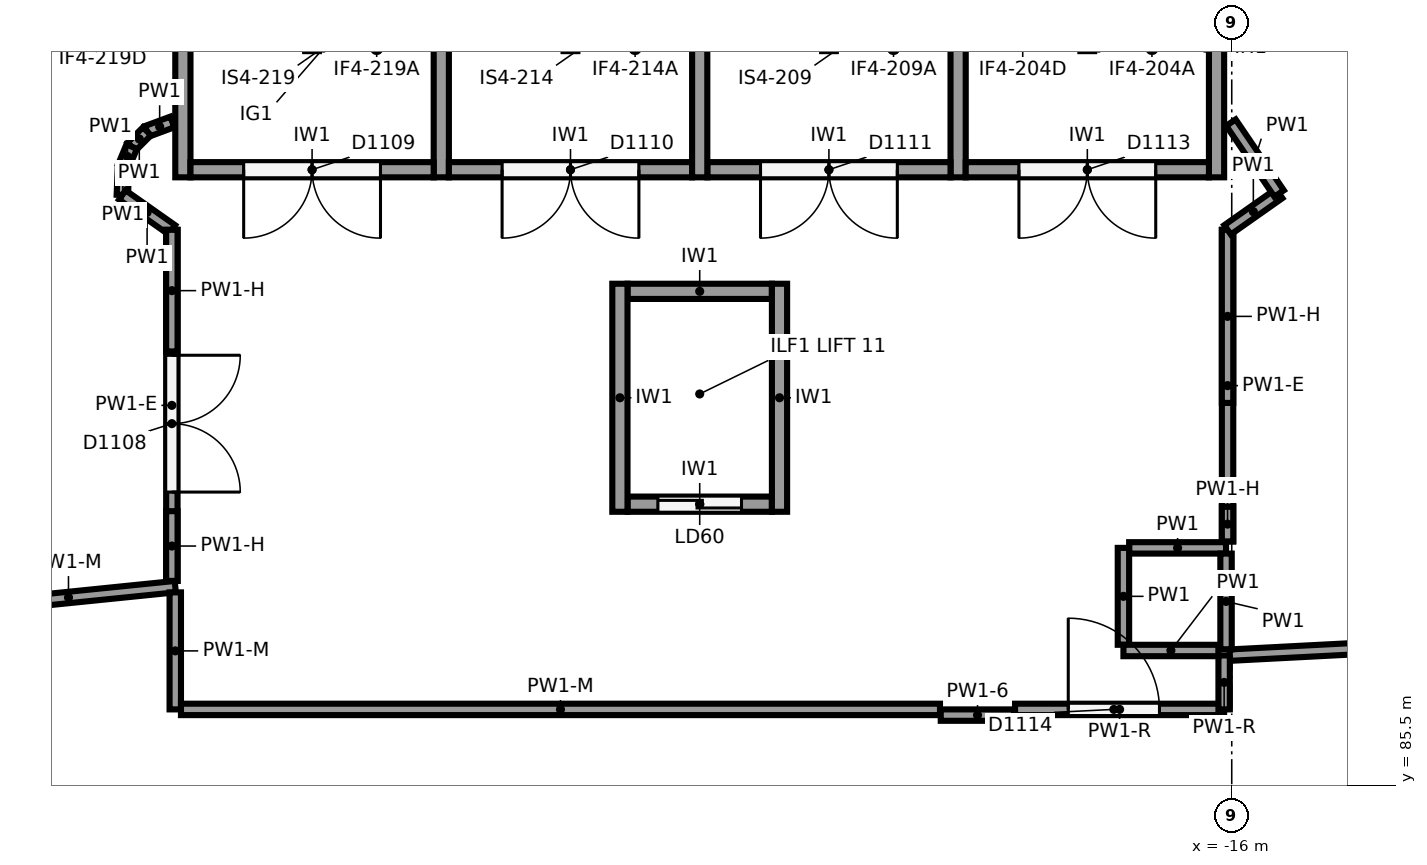
"""IFC4 building model, lengths in metres.
Left out: names, types, materials, properties, quantities, classifications, styles, units other than length and angle.
Written with IfcOpenShell. Run it as: python <this file> out.ifc"""

import sys

from ifc_helpers import new_model, si_unit, direction, frame, frame_2d, origin, origin_2d, place, context, subcontext, project, spatial, rectangle, circle, extrude, element, fill, save


model = new_model("IFC4")
c1 = context("Model", 3, precision=1e-05, world=origin(), true_north=direction((0.0, 1.0)))
c2 = subcontext(c1, "Body", "Model", "MODEL_VIEW")
j1 = project(units=[si_unit("LENGTHUNIT", "METRE"), si_unit("PLANEANGLEUNIT", "RADIAN")], contexts=[c1])
p1 = place(None, origin())
s1 = spatial("IfcSite", under=j1, at=p1, CompositionType="ELEMENT")
p2 = place(p1, origin())
s2 = spatial("IfcBuilding", under=s1, at=p2, CompositionType="ELEMENT")
p3 = place(p2, frame((0.0, 0.0, 12.0)))
s3 = spatial("IfcBuildingStorey", under=s2, at=p3, CompositionType="ELEMENT", Elevation=12.0)
p4 = place(p3, frame((-19.119, 85.698, 0.0), z_axis=(0.0, 0.0, 1.0), x_axis=(1.0, 0.0, 0.0)))
e1 = element("IfcColumn", 1, at=p4, inside=s3, PredefinedType="COLUMN", context=c2, shape_type="SweptSolid", body=[
    extrude(circle(Radius=0.4, at=origin_2d()), origin(), (0.0, 0.0, 1.0), 6.0),
])
p5 = place(p3, frame((-19.627, 89.904, 0.0), z_axis=(0.0, 0.0, 1.0), x_axis=(1.0, 0.0, 0.0)))
e2 = element("IfcColumn", 2, at=p5, inside=s3, PredefinedType="COLUMN", context=c2, shape_type="SweptSolid", body=[
    extrude(circle(Radius=0.55, at=origin_2d()), origin(), (0.0, 0.0, 1.0), 6.0),
])
p6 = place(p3, frame((-31.737, 85.377, 0.0), z_axis=(0.0, 0.0, 1.0), x_axis=(1.0, 0.0, 0.0)))
e3 = element("IfcColumn", 3, at=p6, inside=s3, PredefinedType="COLUMN", context=c2, shape_type="SweptSolid", body=[
    extrude(circle(Radius=0.4, at=origin_2d()), origin(), (0.0, 0.0, 1.0), 6.0),
])
for number, where, z_axis, x_axis in (
    (4, (-16.2, 102.3, 0.0), (0.0, 0.0, 1.0), (0.0, -1.0, 0.0)),
    (5, (-23.0, 102.3, 0.0), (0.0, 0.0, 1.0), (0.0, -1.0, 0.0)),
    (6, (-29.8, 102.3, 0.0), (0.0, 0.0, 1.0), (0.0, -1.0, 0.0)),
    (7, (-19.6, 102.3, 0.0), (0.0, 0.0, 1.0), (0.0, -1.0, 0.0)),
    (8, (-26.4, 102.3, 0.0), (0.0, 0.0, 1.0), (0.0, -1.0, 0.0)),
):
    element("IfcWall", number, at=place(p3, frame(where, z_axis=z_axis, x_axis=x_axis)), inside=s3, PredefinedType="SHEAR", context=c2, shape_type="SweptSolid", body=[
        extrude(rectangle(XDim=8.8, YDim=0.2, at=frame_2d((4.4, 0.0))), origin(), (0.0, 0.0, 1.0), 5.65),
    ])
p7 = place(p3, frame((-16.3, 93.6, 0.0), z_axis=(0.0, 0.0, 1.0), x_axis=(-1.0, 0.0, 0.0)))
e9 = element("IfcWall", 9, at=p7, inside=s3, PredefinedType="SHEAR", context=c2, shape_type="SweptSolid", body=[
    extrude(rectangle(XDim=3.2, YDim=0.2, at=frame_2d((1.6, 0.0))), origin(), (0.0, 0.0, 1.0), 5.65),
])
p8 = place(p7, frame((0.7, 0.0, 0.0)))
e10 = element("IfcOpeningElement", 10, at=p8, cuts=e9, PredefinedType="OPENING", context=c2, shape_type="SweptSolid", body=[
    extrude(rectangle(XDim=1.8, YDim=2.1, at=frame_2d((0.9, 1.05))), frame((0.0, 0.11, 0.0), z_axis=(0.0, -1.0, 0.0), x_axis=(1.0, 0.0, 0.0)), (0.0, 0.0, 1.0), 0.22),
])
p9 = place(p3, frame((-19.7, 93.6, 0.0), z_axis=(0.0, 0.0, 1.0), x_axis=(-1.0, 0.0, 0.0)))
e11 = element("IfcWall", 11, at=p9, inside=s3, PredefinedType="SHEAR", context=c2, shape_type="SweptSolid", body=[
    extrude(rectangle(XDim=3.2, YDim=0.2, at=frame_2d((1.6, 0.0))), origin(), (0.0, 0.0, 1.0), 5.65),
])
p10 = place(p9, frame((0.7, 0.0, 0.0)))
e12 = element("IfcOpeningElement", 12, at=p10, cuts=e11, PredefinedType="OPENING", context=c2, shape_type="SweptSolid", body=[
    extrude(rectangle(XDim=1.8, YDim=2.1, at=frame_2d((0.9, 1.05))), frame((0.0, 0.11, 0.0), z_axis=(0.0, -1.0, 0.0), x_axis=(1.0, 0.0, 0.0)), (0.0, 0.0, 1.0), 0.22),
])
p11 = place(p3, frame((-23.1, 93.6, 0.0), z_axis=(0.0, 0.0, 1.0), x_axis=(-1.0, 0.0, 0.0)))
e13 = element("IfcWall", 13, at=p11, inside=s3, PredefinedType="SHEAR", context=c2, shape_type="SweptSolid", body=[
    extrude(rectangle(XDim=3.2, YDim=0.2, at=frame_2d((1.6, 0.0))), origin(), (0.0, 0.0, 1.0), 5.65),
])
p12 = place(p11, frame((0.7, 0.0, 0.0)))
e14 = element("IfcOpeningElement", 14, at=p12, cuts=e13, PredefinedType="OPENING", context=c2, shape_type="SweptSolid", body=[
    extrude(rectangle(XDim=1.8, YDim=2.1, at=frame_2d((0.9, 1.05))), frame((0.0, 0.11, 0.0), z_axis=(0.0, -1.0, 0.0), x_axis=(1.0, 0.0, 0.0)), (0.0, 0.0, 1.0), 0.22),
])
p13 = place(p3, frame((-26.5, 93.6, 0.0), z_axis=(0.0, 0.0, 1.0), x_axis=(-1.0, 0.0, 0.0)))
e15 = element("IfcWall", 15, at=p13, inside=s3, PredefinedType="SHEAR", context=c2, shape_type="SweptSolid", body=[
    extrude(rectangle(XDim=3.2, YDim=0.2, at=frame_2d((1.6, 0.0))), origin(), (0.0, 0.0, 1.0), 5.65),
])
p14 = place(p13, frame((0.7, 0.0, 0.0)))
e16 = element("IfcOpeningElement", 16, at=p14, cuts=e15, PredefinedType="OPENING", context=c2, shape_type="SweptSolid", body=[
    extrude(rectangle(XDim=1.8, YDim=2.1, at=frame_2d((0.9, 1.05))), frame((0.0, 0.11, 0.0), z_axis=(0.0, -1.0, 0.0), x_axis=(1.0, 0.0, 0.0)), (0.0, 0.0, 1.0), 0.22),
])
for number, where, z_axis, x_axis in (
    (17, (-21.95, 92.1, 0.0), (0.0, 0.0, 1.0), (0.0, -1.0, 0.0)),
    (18, (-24.05, 92.1, 0.0), (0.0, 0.0, 1.0), (0.0, -1.0, 0.0)),
):
    element("IfcWall", number, at=place(p3, frame(where, z_axis=z_axis, x_axis=x_axis)), inside=s3, PredefinedType="SHEAR", context=c2, shape_type="SweptSolid", body=[
        extrude(rectangle(XDim=3.0, YDim=0.2, at=frame_2d((1.5, 0.0))), origin(), (0.0, 0.0, 1.0), 5.65),
    ])
p15 = place(p3, frame((-22.05, 92.0, 0.0), z_axis=(0.0, 0.0, 1.0), x_axis=(-1.0, 0.0, 0.0)))
e19 = element("IfcWall", 19, at=p15, inside=s3, PredefinedType="SHEAR", context=c2, shape_type="SweptSolid", body=[
    extrude(rectangle(XDim=1.9, YDim=0.2, at=frame_2d((0.95, 0.0))), origin(), (0.0, 0.0, 1.0), 5.65),
])
p16 = place(p3, frame((-22.05, 89.2, 0.0), z_axis=(0.0, 0.0, 1.0), x_axis=(-1.0, 0.0, 0.0)))
e20 = element("IfcWall", 20, at=p16, inside=s3, PredefinedType="SHEAR", context=c2, shape_type="SweptSolid", body=[
    extrude(rectangle(XDim=1.9, YDim=0.2, at=frame_2d((0.95, 0.0))), origin(), (0.0, 0.0, 1.0), 5.65),
])
p17 = place(p16, frame((0.4, 0.0, 0.0)))
e21 = element("IfcOpeningElement", 21, at=p17, cuts=e20, PredefinedType="OPENING", context=c2, shape_type="SweptSolid", body=[
    extrude(rectangle(XDim=1.1, YDim=2.1, at=frame_2d((0.55, 1.05))), frame((0.0, 0.11, 0.0), z_axis=(0.0, -1.0, 0.0), x_axis=(1.0, 0.0, 0.0)), (0.0, 0.0, 1.0), 0.22),
])
p18 = place(p3, frame((-18.851, 86.5, 0.0), z_axis=(0.0, 0.0, 1.0), x_axis=(1.0, 0.0, 0.0)))
e22 = element("IfcWall", 22, at=p18, inside=s3, PredefinedType="PARTITIONING", context=c2, shape_type="SweptSolid", body=[
    extrude(rectangle(XDim=2.751, YDim=0.15, at=frame_2d((1.375, 0.0))), origin(), (0.0, 0.0, 1.0), 4.181),
])
p19 = place(p18, frame((0.7, 0.0, 0.0)))
e23 = element("IfcOpeningElement", 23, at=p19, cuts=e22, PredefinedType="OPENING", context=c2, shape_type="SweptSolid", body=[
    extrude(rectangle(XDim=1.2, YDim=2.1, at=frame_2d((0.6, 1.05))), frame((0.0, 0.085, 0.0), z_axis=(0.0, -1.0, 0.0), x_axis=(1.0, 0.0, 0.0)), (0.0, 0.0, 1.0), 0.17),
])
p20 = place(p3, frame((-16.1, 86.5, 0.0), z_axis=(0.0, 0.0, 1.0), x_axis=(0.0, 1.0, 0.0)))
e24 = element("IfcWall", 24, at=p20, inside=s3, PredefinedType="PARTITIONING", context=c2, shape_type="SweptSolid", body=[
    extrude(rectangle(XDim=0.71, YDim=0.15, at=frame_2d((0.355, 0.0))), origin(), (0.0, 0.0, 1.0), 4.181),
])
p21 = place(p3, frame((-16.025, 87.214, 0.0), z_axis=(0.0, 0.0, 1.0), x_axis=(0.998660530851, 0.051741126006, 0.0)))
e25 = element("IfcWall", 25, at=p21, inside=s3, PredefinedType="PARTITIONING", context=c2, shape_type="SweptSolid", body=[
    extrude(rectangle(XDim=9.027, YDim=0.15, at=frame_2d((4.513, 0.0))), origin(), (0.0, 0.0, 1.0), 4.181),
])
p22 = place(p3, frame((-32.71, 87.83, 0.0), z_axis=(0.0, 0.0, 1.0), x_axis=(0.994882835279, 0.101035360476, 0.0)))
e26 = element("IfcWall", 26, at=p22, inside=s3, PredefinedType="PARTITIONING", context=c2, shape_type="SweptSolid", body=[
    extrude(rectangle(XDim=2.825, YDim=0.15, at=frame_2d((1.412, 0.0))), origin(), (0.0, 0.0, 1.0), 3.655),
])
p23 = place(p3, frame((-29.9, 88.04, 0.0), z_axis=(0.0, 0.0, 1.0), x_axis=(0.0, -1.0, 0.0)))
e27 = element("IfcWall", 27, at=p23, inside=s3, PredefinedType="PARTITIONING", context=c2, shape_type="SweptSolid", body=[
    extrude(rectangle(XDim=1.54, YDim=0.15, at=frame_2d((0.77, 0.0))), origin(), (0.0, 0.0, 1.0), 3.655),
])
p24 = place(p3, frame((-29.825, 86.5, 0.0), z_axis=(0.0, 0.0, 1.0), x_axis=(1.0, 0.0, 0.0)))
e28 = element("IfcWall", 28, at=p24, inside=s3, PredefinedType="PARTITIONING", context=c2, shape_type="SweptSolid", body=[
    extrude(rectangle(XDim=9.986, YDim=0.15, at=frame_2d((4.993, 0.0))), origin(), (0.0, 0.0, 1.0), 3.655),
])
p25 = place(p3, frame((-16.075, 88.625, 0.0), z_axis=(0.0, 0.0, 1.0), x_axis=(-1.0, 0.0, 0.0)))
e29 = element("IfcWall", 29, at=p25, inside=s3, PredefinedType="PARTITIONING", context=c2, shape_type="SweptSolid", body=[
    extrude(rectangle(XDim=1.275, YDim=0.15, at=frame_2d((0.638, 0.0))), origin(), (0.0, 0.0, 1.0), 5.65),
])
p26 = place(p3, frame((-17.425, 88.625, 0.0), z_axis=(0.0, 0.0, 1.0), x_axis=(0.0, -1.0, 0.0)))
e30 = element("IfcWall", 30, at=p26, inside=s3, PredefinedType="PARTITIONING", context=c2, shape_type="SweptSolid", body=[
    extrude(rectangle(XDim=1.275, YDim=0.15, at=frame_2d((0.637, 0.0))), origin(), (0.0, 0.0, 1.0), 5.65),
])
p27 = place(p3, frame((-17.425, 87.275, 0.0), z_axis=(0.0, 0.0, 1.0), x_axis=(1.0, 0.0, 0.0)))
e31 = element("IfcWall", 31, at=p27, inside=s3, PredefinedType="PARTITIONING", context=c2, shape_type="SweptSolid", body=[
    extrude(rectangle(XDim=1.249, YDim=0.15, at=frame_2d((0.625, 0.0))), origin(), (0.0, 0.0, 1.0), 5.65),
])
p28 = place(p3, frame((-16.075, 87.291, 0.0), z_axis=(0.0, 0.0, 1.0), x_axis=(0.0, 1.0, 0.0)))
e32 = element("IfcWall", 32, at=p28, inside=s3, PredefinedType="PARTITIONING", context=c2, shape_type="SweptSolid", body=[
    extrude(rectangle(XDim=1.259, YDim=0.15, at=frame_2d((0.629, 0.0))), origin(), (0.0, 0.0, 1.0), 5.65),
])
p29 = place(p3, frame((-29.938, 94.229, 0.0), z_axis=(0.0, 0.0, 1.0), x_axis=(-0.937674325327, -0.347515265308, 0.0)))
e33 = element("IfcWall", 33, at=p29, inside=s3, PredefinedType="PARTITIONING", context=c2, shape_type="SweptSolid", body=[
    extrude(rectangle(XDim=0.356, YDim=0.15, at=frame_2d((0.178, 0.0))), origin(), (0.0, 0.0, 1.0), 5.65),
])
p30 = place(p3, frame((-30.272, 94.105, 0.0), z_axis=(0.0, 0.0, 1.0), x_axis=(-0.707534941396, -0.706678361564, 0.0)))
e34 = element("IfcWall", 34, at=p30, inside=s3, PredefinedType="PARTITIONING", context=c2, shape_type="SweptSolid", body=[
    extrude(rectangle(XDim=0.285, YDim=0.15, at=frame_2d((0.143, 0.0))), origin(), (0.0, 0.0, 1.0), 5.65),
])
p31 = place(p3, frame((-30.474, 93.904, 0.0), z_axis=(0.0, 0.0, 1.0), x_axis=(-0.382275228123, -0.924048510611, 0.0)))
e35 = element("IfcWall", 35, at=p31, inside=s3, PredefinedType="PARTITIONING", context=c2, shape_type="SweptSolid", body=[
    extrude(rectangle(XDim=0.282, YDim=0.15, at=frame_2d((0.141, 0.0))), origin(), (0.0, 0.0, 1.0), 5.65),
])
p32 = place(p3, frame((-30.582, 93.643, 0.0), z_axis=(0.0, 0.0, 1.0), x_axis=(-0.038982051143, -0.999239910977, 0.0)))
e36 = element("IfcWall", 36, at=p32, inside=s3, PredefinedType="PARTITIONING", context=c2, shape_type="SweptSolid", body=[
    extrude(rectangle(XDim=0.376, YDim=0.15, at=frame_2d((0.188, 0.0))), origin(), (0.0, 0.0, 1.0), 5.65),
])
p33 = place(p3, frame((-30.596, 93.268, 0.0), z_axis=(0.0, 0.0, 1.0), x_axis=(0.817731616096, -0.57559969079, 0.0)))
e37 = element("IfcWall", 37, at=p33, inside=s3, PredefinedType="PARTITIONING", context=c2, shape_type="SweptSolid", body=[
    extrude(rectangle(XDim=0.797, YDim=0.15, at=frame_2d((0.398, 0.0))), origin(), (0.0, 0.0, 1.0), 5.65),
])
p34 = place(p3, frame((-29.945, 92.809, 0.0), z_axis=(0.0, 0.0, 1.0), x_axis=(0.0, -1.0, 0.0)))
e38 = element("IfcWall", 38, at=p34, inside=s3, PredefinedType="PARTITIONING", context=c2, shape_type="SweptSolid", body=[
    extrude(rectangle(XDim=4.619, YDim=0.15, at=frame_2d((2.309, 0.0))), origin(), (0.0, 0.0, 1.0), 4.35),
])
p35 = place(p34, frame((1.65, 0.0, 0.0)))
e39 = element("IfcOpeningElement", 39, at=p35, cuts=e38, PredefinedType="OPENING", context=c2, shape_type="SweptSolid", body=[
    extrude(rectangle(XDim=1.8, YDim=2.1, at=frame_2d((0.9, 1.05))), frame((0.0, 0.085, 0.0), z_axis=(0.0, -1.0, 0.0), x_axis=(1.0, 0.0, 0.0)), (0.0, 0.0, 1.0), 0.17),
])
p36 = place(p3, frame((-29.945, 92.809, 4.35), z_axis=(0.0, 0.0, 1.0), x_axis=(0.0, -1.0, 0.0)))
e40 = element("IfcWall", 40, at=p36, inside=s3, PredefinedType="PARTITIONING", context=c2, shape_type="SweptSolid", body=[
    extrude(rectangle(XDim=1.6, YDim=0.15, at=frame_2d((0.8, 0.0))), origin(), (0.0, 0.0, 1.0), 1.3),
])
p37 = place(p3, frame((-29.945, 89.108, 4.35), z_axis=(0.0, 0.0, 1.0), x_axis=(0.0, -1.0, 0.0)))
e41 = element("IfcWall", 41, at=p37, inside=s3, PredefinedType="PARTITIONING", context=c2, shape_type="SweptSolid", body=[
    extrude(rectangle(XDim=0.917, YDim=0.15, at=frame_2d((0.458, 0.0))), origin(), (0.0, 0.0, 1.0), 1.3),
])
p38 = place(p3, frame((-19.829, 86.425, 0.0), z_axis=(0.0, 0.0, 1.0), x_axis=(1.0, 0.0, 0.0)))
e42 = element("IfcWall", 42, at=p38, inside=s3, PredefinedType="PARTITIONING", context=c2, shape_type="SweptSolid", body=[
    extrude(rectangle(XDim=0.968, YDim=0.15, at=frame_2d((0.484, 0.0))), origin(), (0.0, 0.0, 1.0), 4.9),
])
p39 = place(p3, frame((-16.055, 88.71, 0.0), z_axis=(0.0, 0.0, 1.0), x_axis=(0.0, 1.0, 0.0)))
e43 = element("IfcWall", 43, at=p39, inside=s3, PredefinedType="PARTITIONING", context=c2, shape_type="SweptSolid", body=[
    extrude(rectangle(XDim=4.099, YDim=0.15, at=frame_2d((2.05, 0.0))), origin(), (0.0, 0.0, 1.0), 4.35),
])
p40 = place(p3, frame((-16.055, 88.71, 4.35), z_axis=(0.0, 0.0, 1.0), x_axis=(0.0, 1.0, 0.0)))
e44 = element("IfcWall", 44, at=p40, inside=s3, PredefinedType="PARTITIONING", context=c2, shape_type="SweptSolid", body=[
    extrude(rectangle(XDim=0.456, YDim=0.15, at=frame_2d((0.228, 0.0))), origin(), (0.0, 0.0, 1.0), 1.3),
])
p41 = place(p3, frame((-16.055, 90.532, 4.35), z_axis=(0.0, 0.0, 1.0), x_axis=(0.0, 1.0, 0.0)))
e45 = element("IfcWall", 45, at=p41, inside=s3, PredefinedType="PARTITIONING", context=c2, shape_type="SweptSolid", body=[
    extrude(rectangle(XDim=2.277, YDim=0.15, at=frame_2d((1.139, 0.0))), origin(), (0.0, 0.0, 1.0), 1.3),
])
p42 = place(p3, frame((-16.055, 92.809, 0.0), z_axis=(0.0, 0.0, 1.0), x_axis=(0.81774999294, 0.575573582652, 0.0)))
e46 = element("IfcWall", 46, at=p42, inside=s3, PredefinedType="PARTITIONING", context=c2, shape_type="SweptSolid", body=[
    extrude(rectangle(XDim=0.83, YDim=0.15, at=frame_2d((0.415, 0.0))), origin(), (0.0, 0.0, 1.0), 5.65),
])
p43 = place(p3, frame((-15.376, 93.287, 0.0), z_axis=(0.0, 0.0, 1.0), x_axis=(-0.562120553728, 0.827055308354, 0.0)))
e47 = element("IfcWall", 47, at=p43, inside=s3, PredefinedType="PARTITIONING", context=c2, shape_type="SweptSolid", body=[
    extrude(rectangle(XDim=1.128, YDim=0.15, at=frame_2d((0.564, 0.0))), origin(), (0.0, 0.0, 1.0), 5.65),
])
p44 = place(p8, origin())
e48 = element("IfcDoor", 48, at=p44, inside=s3, OperationType="DOUBLE_DOOR_SINGLE_SWING", PredefinedType="DOOR", context=c2, shape_type="SweptSolid", body=[
    extrude(rectangle(XDim=1.8, YDim=2.1, at=frame_2d((0.9, 1.05))), frame((0.0, 0.025, 0.0), z_axis=(0.0, -1.0, 0.0), x_axis=(1.0, 0.0, 0.0)), (0.0, 0.0, 1.0), 0.05),
])
fill(e10, e48)
p45 = place(p10, origin())
e49 = element("IfcDoor", 49, at=p45, inside=s3, OperationType="DOUBLE_DOOR_SINGLE_SWING", PredefinedType="DOOR", context=c2, shape_type="SweptSolid", body=[
    extrude(rectangle(XDim=1.8, YDim=2.1, at=frame_2d((0.9, 1.05))), frame((0.0, 0.025, 0.0), z_axis=(0.0, -1.0, 0.0), x_axis=(1.0, 0.0, 0.0)), (0.0, 0.0, 1.0), 0.05),
])
fill(e12, e49)
p46 = place(p12, origin())
e50 = element("IfcDoor", 50, at=p46, inside=s3, OperationType="DOUBLE_DOOR_SINGLE_SWING", PredefinedType="DOOR", context=c2, shape_type="SweptSolid", body=[
    extrude(rectangle(XDim=1.8, YDim=2.1, at=frame_2d((0.9, 1.05))), frame((0.0, 0.025, 0.0), z_axis=(0.0, -1.0, 0.0), x_axis=(1.0, 0.0, 0.0)), (0.0, 0.0, 1.0), 0.05),
])
fill(e14, e50)
p47 = place(p14, origin())
e51 = element("IfcDoor", 51, at=p47, inside=s3, OperationType="DOUBLE_DOOR_SINGLE_SWING", PredefinedType="DOOR", context=c2, shape_type="SweptSolid", body=[
    extrude(rectangle(XDim=1.8, YDim=2.1, at=frame_2d((0.9, 1.05))), frame((0.0, 0.025, 0.0), z_axis=(0.0, -1.0, 0.0), x_axis=(1.0, 0.0, 0.0)), (0.0, 0.0, 1.0), 0.05),
])
fill(e16, e51)
p48 = place(p17, origin())
e52 = element("IfcDoor", 52, at=p48, inside=s3, OperationType="SLIDING_TO_RIGHT", PredefinedType="DOOR", context=c2, shape_type="SweptSolid", body=[
    extrude(rectangle(XDim=1.1, YDim=2.1, at=frame_2d((0.55, 1.05))), frame((0.0, 0.025, 0.0), z_axis=(0.0, -1.0, 0.0), x_axis=(1.0, 0.0, 0.0)), (0.0, 0.0, 1.0), 0.05),
])
fill(e21, e52)
p49 = place(p19, origin())
e53 = element("IfcDoor", 53, at=p49, inside=s3, OperationType="SINGLE_SWING_LEFT", PredefinedType="DOOR", context=c2, shape_type="SweptSolid", body=[
    extrude(rectangle(XDim=1.2, YDim=2.1, at=frame_2d((0.6, 1.05))), frame((0.0, 0.025, 0.0), z_axis=(0.0, -1.0, 0.0), x_axis=(1.0, 0.0, 0.0)), (0.0, 0.0, 1.0), 0.05),
])
fill(e23, e53)
p50 = place(p35, origin())
e54 = element("IfcDoor", 54, at=p50, inside=s3, OperationType="DOUBLE_DOOR_SINGLE_SWING", PredefinedType="DOOR", context=c2, shape_type="SweptSolid", body=[
    extrude(rectangle(XDim=1.8, YDim=2.1, at=frame_2d((0.9, 1.05))), frame((0.0, 0.025, 0.0), z_axis=(0.0, -1.0, 0.0), x_axis=(1.0, 0.0, 0.0)), (0.0, 0.0, 1.0), 0.05),
])
fill(e39, e54)
save(model, sys.argv[1])
